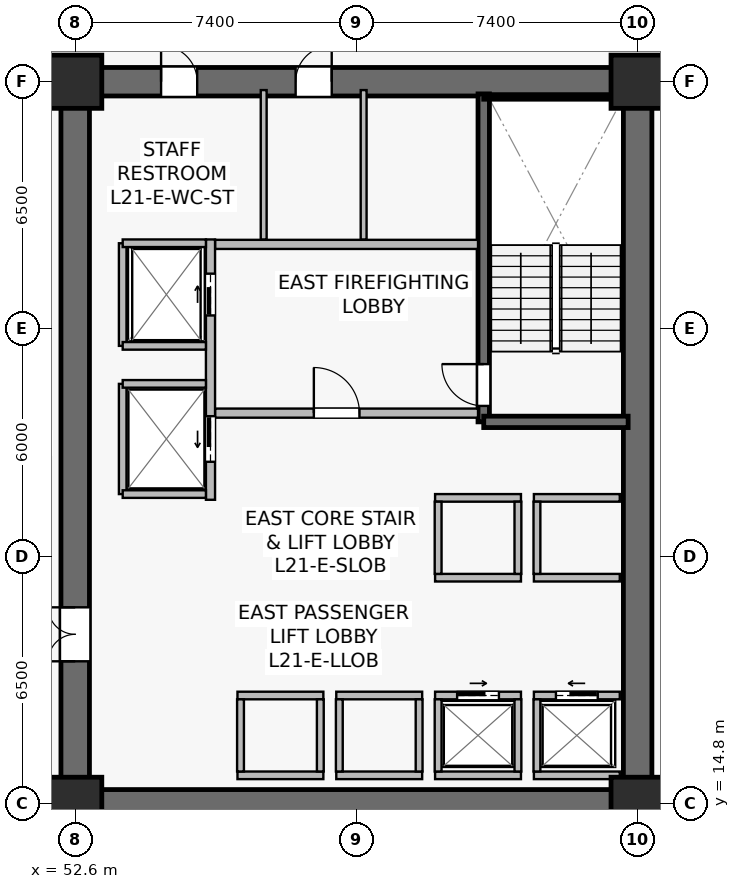
"""IFC4 building model, lengths in metres.
Left out: names, types, materials, properties, quantities, classifications, styles, units other than length and angle.
Written with IfcOpenShell. Run it as: python <this file> out.ifc"""

import sys

from ifc_helpers import new_model, si_unit, direction, frame, frame_2d, origin, origin_2d, place, context, subcontext, project, spatial, rectangle, extrude, source, transform, mapped, element, fill, save


model = new_model("IFC4")
c1 = context("Model", 3, precision=1e-05, world=origin(), true_north=direction((0.0, 1.0)))
c2 = subcontext(c1, "Body", "Model", "MODEL_VIEW")
j1 = project(units=[si_unit("LENGTHUNIT", "METRE"), si_unit("PLANEANGLEUNIT", "RADIAN")], contexts=[c1])
p1 = place(None, origin())
s1 = spatial("IfcSite", under=j1, at=p1, CompositionType="ELEMENT")
p2 = place(p1, origin())
s2 = spatial("IfcBuilding", under=s1, at=p2, CompositionType="ELEMENT")
p3 = place(p2, frame((0.0, 0.0, 86.7)))
s3 = spatial("IfcBuildingStorey", under=s2, at=p3, CompositionType="ELEMENT", Elevation=86.7)
p4 = place(p3, frame((52.225, 14.8, 0.0), z_axis=(0.0, 0.0, 1.0), x_axis=(1.0, 0.0, 0.0)))
e1 = element("IfcWall", 1, at=p4, inside=s3, PredefinedType="SHEAR", context=c2, shape_type="SweptSolid", body=[
    extrude(rectangle(XDim=15.55, YDim=0.75, at=frame_2d((7.775, 0.0))), origin(), (0.0, 0.0, 1.0), 3.78),
])
p5 = place(p3, frame((52.225, 33.8, 0.0), z_axis=(0.0, 0.0, 1.0), x_axis=(1.0, 0.0, 0.0)))
e2 = element("IfcWall", 2, at=p5, inside=s3, PredefinedType="SHEAR", context=c2, shape_type="SweptSolid", body=[
    extrude(rectangle(XDim=15.55, YDim=0.75, at=frame_2d((7.775, 0.0))), origin(), (0.0, 0.0, 1.0), 3.78),
])
p6 = place(p5, frame((6.175, 0.0, 0.0)))
e3 = element("IfcOpeningElement", 3, at=p6, cuts=e2, PredefinedType="OPENING", context=c2, shape_type="SweptSolid", body=[
    extrude(rectangle(XDim=0.95, YDim=2.15, at=frame_2d((0.475, 1.075))), frame((0.0, 0.385, 0.0), z_axis=(0.0, -1.0, 0.0), x_axis=(1.0, 0.0, 0.0)), (0.0, 0.0, 1.0), 0.77),
])
p7 = place(p5, frame((2.635, 0.0, 0.0)))
e4 = element("IfcOpeningElement", 4, at=p7, cuts=e2, PredefinedType="OPENING", context=c2, shape_type="SweptSolid", body=[
    extrude(rectangle(XDim=0.95, YDim=2.15, at=frame_2d((0.475, 1.075))), frame((0.0, 0.385, 0.0), z_axis=(0.0, -1.0, 0.0), x_axis=(1.0, 0.0, 0.0)), (0.0, 0.0, 1.0), 0.77),
])
p8 = place(p3, frame((52.6, 15.175, 0.0), z_axis=(0.0, 0.0, 1.0), x_axis=(0.0, 1.0, 0.0)))
e5 = element("IfcWall", 5, at=p8, inside=s3, PredefinedType="SHEAR", context=c2, shape_type="SweptSolid", body=[
    extrude(rectangle(XDim=18.25, YDim=0.75, at=frame_2d((9.125, 0.0))), origin(), (0.0, 0.0, 1.0), 3.78),
])
p9 = place(p8, frame((3.375, 0.0, 0.0)))
e6 = element("IfcOpeningElement", 6, at=p9, cuts=e5, PredefinedType="OPENING", context=c2, shape_type="SweptSolid", body=[
    extrude(rectangle(XDim=1.42, YDim=2.2, at=frame_2d((0.71, 1.1))), frame((0.0, 0.385, 0.0), z_axis=(0.0, -1.0, 0.0), x_axis=(1.0, 0.0, 0.0)), (0.0, 0.0, 1.0), 0.77),
])
p10 = place(p3, frame((67.4, 15.175, 0.0), z_axis=(0.0, 0.0, 1.0), x_axis=(0.0, 1.0, 0.0)))
e7 = element("IfcWall", 7, at=p10, inside=s3, PredefinedType="SHEAR", context=c2, shape_type="SweptSolid", body=[
    extrude(rectangle(XDim=18.25, YDim=0.75, at=frame_2d((9.125, 0.0))), origin(), (0.0, 0.0, 1.0), 3.78),
])
p11 = place(p3, frame((63.35, 24.85, 0.0), z_axis=(0.0, 0.0, 1.0), x_axis=(0.0, 1.0, 0.0)))
e8 = element("IfcWall", 8, at=p11, inside=s3, PredefinedType="SHEAR", context=c2, shape_type="SweptSolid", body=[
    extrude(rectangle(XDim=8.63, YDim=0.3, at=frame_2d((4.315, 0.0))), origin(), (0.0, 0.0, 1.0), 3.78),
])
p12 = place(p11, frame((0.42, 0.0, 0.0)))
e9 = element("IfcOpeningElement", 9, at=p12, cuts=e8, PredefinedType="OPENING", context=c2, shape_type="SweptSolid", body=[
    extrude(rectangle(XDim=1.1, YDim=2.15, at=frame_2d((0.55, 1.075))), frame((0.0, 0.16, 0.0), z_axis=(0.0, -1.0, 0.0), x_axis=(1.0, 0.0, 0.0)), (0.0, 0.0, 1.0), 0.32),
])
p13 = place(p3, frame((63.35, 24.85, 0.0), z_axis=(0.0, 0.0, 1.0), x_axis=(1.0, 0.0, 0.0)))
e10 = element("IfcWall", 10, at=p13, inside=s3, PredefinedType="SHEAR", context=c2, shape_type="SweptSolid", body=[
    extrude(rectangle(XDim=3.8, YDim=0.3, at=frame_2d((1.9, 0.0))), origin(), (0.0, 0.0, 1.0), 3.78),
])
p14 = place(p3, frame((63.35, 33.4, 0.0), z_axis=(0.0, 0.0, 1.0), x_axis=(1.0, 0.0, 0.0)))
e11 = element("IfcWall", 11, at=p14, inside=s3, PredefinedType="SOLIDWALL", context=c2, shape_type="SweptSolid", body=[
    extrude(rectangle(XDim=3.72, YDim=0.12, at=frame_2d((1.86, 0.0))), origin(), (0.0, 0.0, 1.0), 3.78),
])
m1 = source(origin(), c2, "Body", "SweptSolid", [
    extrude(rectangle(XDim=1.4, YDim=1.4, at=origin_2d()), origin(), (0.0, 0.0, 1.0), 4.1),
])
for number, where, z_axis, x_axis in (
    (12, (52.6, 14.8, 0.0), (0.0, 0.0, 1.0), (1.0, 0.0, 0.0)),
    (13, (67.4, 14.8, 0.0), (0.0, 0.0, 1.0), (1.0, 0.0, 0.0)),
    (14, (52.6, 33.8, 0.0), (0.0, 0.0, 1.0), (1.0, 0.0, 0.0)),
    (15, (67.4, 33.8, 0.0), (0.0, 0.0, 1.0), (1.0, 0.0, 0.0)),
):
    element("IfcColumn", number, at=place(p3, frame(where, z_axis=z_axis, x_axis=x_axis)), inside=s3, PredefinedType="COLUMN", context=c2, shape_type="MappedRepresentation", body=[
        mapped(m1, transform((0.0, 0.0, 0.0), scale=1.0)),
    ])
p15 = place(p3, frame((56.28, 25.08, 0.0), z_axis=(0.0, 0.0, 1.0), x_axis=(1.0, 0.0, 0.0)))
e16 = element("IfcWall", 16, at=p15, inside=s3, PredefinedType="SOLIDWALL", context=c2, shape_type="SweptSolid", body=[
    extrude(rectangle(XDim=6.92, YDim=0.24, at=frame_2d((3.46, 0.0))), origin(), (0.0, 0.0, 1.0), 3.115),
])
p16 = place(p15, frame((2.6, 0.0, 0.0)))
e17 = element("IfcOpeningElement", 17, at=p16, cuts=e16, PredefinedType="OPENING", context=c2, shape_type="SweptSolid", body=[
    extrude(rectangle(XDim=1.2, YDim=2.16, at=frame_2d((0.6, 1.08))), frame((0.0, 0.13, 0.0), z_axis=(0.0, -1.0, 0.0), x_axis=(1.0, 0.0, 0.0)), (0.0, 0.0, 1.0), 0.26),
])
p17 = place(p3, frame((56.28, 29.52, 0.0), z_axis=(0.0, 0.0, 1.0), x_axis=(1.0, 0.0, 0.0)))
e18 = element("IfcWall", 18, at=p17, inside=s3, PredefinedType="SOLIDWALL", context=c2, shape_type="SweptSolid", body=[
    extrude(rectangle(XDim=6.92, YDim=0.24, at=frame_2d((3.46, 0.0))), origin(), (0.0, 0.0, 1.0), 3.115),
])
p18 = place(p3, frame((56.16, 22.8, 0.0), z_axis=(0.0, 0.0, 1.0), x_axis=(0.0, 1.0, 0.0)))
e19 = element("IfcWall", 19, at=p18, inside=s3, PredefinedType="SOLIDWALL", context=c2, shape_type="SweptSolid", body=[
    extrude(rectangle(XDim=6.85, YDim=0.24, at=frame_2d((3.425, 0.0))), origin(), (0.0, 0.0, 1.0), 2.865),
])
p19 = place(p18, frame((4.85, 0.0, 0.0)))
e20 = element("IfcOpeningElement", 20, at=p19, cuts=e19, PredefinedType="OPENING", context=c2, shape_type="SweptSolid", body=[
    extrude(rectangle(XDim=1.1, YDim=2.22, at=frame_2d((0.55, 1.11))), frame((0.0, 0.13, 0.0), z_axis=(0.0, -1.0, 0.0), x_axis=(1.0, 0.0, 0.0)), (0.0, 0.0, 1.0), 0.26),
])
p20 = place(p18, frame((1.0, 0.0, 0.0)))
e21 = element("IfcOpeningElement", 21, at=p20, cuts=e19, PredefinedType="OPENING", context=c2, shape_type="SweptSolid", body=[
    extrude(rectangle(XDim=1.2, YDim=2.22, at=frame_2d((0.6, 1.11))), frame((0.0, 0.13, 0.0), z_axis=(0.0, -1.0, 0.0), x_axis=(1.0, 0.0, 0.0)), (0.0, 0.0, 1.0), 0.26),
])
p21 = place(p3, frame((64.67, 17.65, 0.0), z_axis=(0.0, 0.0, 1.0), x_axis=(1.0, 0.0, 0.0)))
e22 = element("IfcWall", 22, at=p21, inside=s3, PredefinedType="SOLIDWALL", context=c2, shape_type="SweptSolid", body=[
    extrude(rectangle(XDim=2.26, YDim=0.2, at=frame_2d((1.13, 0.0))), origin(), (0.0, 0.0, 1.0), 3.78),
])
p22 = place(p21, frame((0.58, 0.0, 0.0)))
e23 = element("IfcOpeningElement", 23, at=p22, cuts=e22, PredefinedType="OPENING", context=c2, shape_type="SweptSolid", body=[
    extrude(rectangle(XDim=1.1, YDim=2.22, at=frame_2d((0.55, 1.11))), frame((0.0, 0.11, 0.0), z_axis=(0.0, -1.0, 0.0), x_axis=(1.0, 0.0, 0.0)), (0.0, 0.0, 1.0), 0.22),
])
p23 = place(p3, frame((64.67, 15.55, 0.0), z_axis=(0.0, 0.0, 1.0), x_axis=(1.0, 0.0, 0.0)))
e24 = element("IfcWall", 24, at=p23, inside=s3, PredefinedType="SOLIDWALL", context=c2, shape_type="SweptSolid", body=[
    extrude(rectangle(XDim=2.26, YDim=0.2, at=frame_2d((1.13, 0.0))), origin(), (0.0, 0.0, 1.0), 3.78),
])
p24 = place(p3, frame((64.75, 15.65, 0.0), z_axis=(0.0, 0.0, 1.0), x_axis=(0.0, 1.0, 0.0)))
e25 = element("IfcWall", 25, at=p24, inside=s3, PredefinedType="SOLIDWALL", context=c2, shape_type="SweptSolid", body=[
    extrude(rectangle(XDim=1.9, YDim=0.18, at=frame_2d((0.95, 0.0))), origin(), (0.0, 0.0, 1.0), 3.78),
])
p25 = place(p3, frame((62.07, 17.65, 0.0), z_axis=(0.0, 0.0, 1.0), x_axis=(1.0, 0.0, 0.0)))
e26 = element("IfcWall", 26, at=p25, inside=s3, PredefinedType="SOLIDWALL", context=c2, shape_type="SweptSolid", body=[
    extrude(rectangle(XDim=2.26, YDim=0.2, at=frame_2d((1.13, 0.0))), origin(), (0.0, 0.0, 1.0), 3.78),
])
p26 = place(p25, frame((0.58, 0.0, 0.0)))
e27 = element("IfcOpeningElement", 27, at=p26, cuts=e26, PredefinedType="OPENING", context=c2, shape_type="SweptSolid", body=[
    extrude(rectangle(XDim=1.1, YDim=2.22, at=frame_2d((0.55, 1.11))), frame((0.0, 0.11, 0.0), z_axis=(0.0, -1.0, 0.0), x_axis=(1.0, 0.0, 0.0)), (0.0, 0.0, 1.0), 0.22),
])
p27 = place(p3, frame((62.07, 15.55, 0.0), z_axis=(0.0, 0.0, 1.0), x_axis=(1.0, 0.0, 0.0)))
e28 = element("IfcWall", 28, at=p27, inside=s3, PredefinedType="SOLIDWALL", context=c2, shape_type="SweptSolid", body=[
    extrude(rectangle(XDim=2.26, YDim=0.2, at=frame_2d((1.13, 0.0))), origin(), (0.0, 0.0, 1.0), 3.78),
])
for number, where, z_axis, x_axis in (
    (29, (62.15, 15.65, 0.0), (0.0, 0.0, 1.0), (0.0, 1.0, 0.0)),
    (30, (64.25, 15.65, 0.0), (0.0, 0.0, 1.0), (0.0, 1.0, 0.0)),
):
    element("IfcWall", number, at=place(p3, frame(where, z_axis=z_axis, x_axis=x_axis)), inside=s3, PredefinedType="SOLIDWALL", context=c2, shape_type="SweptSolid", body=[
        extrude(rectangle(XDim=1.9, YDim=0.18, at=frame_2d((0.95, 0.0))), origin(), (0.0, 0.0, 1.0), 3.78),
    ])
for number, where, z_axis, x_axis in (
    (31, (59.47, 17.65, 0.0), (0.0, 0.0, 1.0), (1.0, 0.0, 0.0)),
    (32, (59.47, 15.55, 0.0), (0.0, 0.0, 1.0), (1.0, 0.0, 0.0)),
):
    element("IfcWall", number, at=place(p3, frame(where, z_axis=z_axis, x_axis=x_axis)), inside=s3, PredefinedType="SOLIDWALL", context=c2, shape_type="SweptSolid", body=[
        extrude(rectangle(XDim=2.26, YDim=0.2, at=frame_2d((1.13, 0.0))), origin(), (0.0, 0.0, 1.0), 3.115),
    ])
for number, where, z_axis, x_axis in (
    (33, (59.55, 15.65, 0.0), (0.0, 0.0, 1.0), (0.0, 1.0, 0.0)),
    (34, (61.65, 15.65, 0.0), (0.0, 0.0, 1.0), (0.0, 1.0, 0.0)),
):
    element("IfcWall", number, at=place(p3, frame(where, z_axis=z_axis, x_axis=x_axis)), inside=s3, PredefinedType="SOLIDWALL", context=c2, shape_type="SweptSolid", body=[
        extrude(rectangle(XDim=1.9, YDim=0.18, at=frame_2d((0.95, 0.0))), origin(), (0.0, 0.0, 1.0), 3.78),
    ])
for number, where, z_axis, x_axis in (
    (35, (56.87, 17.65, 0.0), (0.0, 0.0, 1.0), (1.0, 0.0, 0.0)),
    (36, (56.87, 15.55, 0.0), (0.0, 0.0, 1.0), (1.0, 0.0, 0.0)),
):
    element("IfcWall", number, at=place(p3, frame(where, z_axis=z_axis, x_axis=x_axis)), inside=s3, PredefinedType="SOLIDWALL", context=c2, shape_type="SweptSolid", body=[
        extrude(rectangle(XDim=2.26, YDim=0.2, at=frame_2d((1.13, 0.0))), origin(), (0.0, 0.0, 1.0), 3.78),
    ])
for number, where, z_axis, x_axis in (
    (37, (56.95, 15.65, 0.0), (0.0, 0.0, 1.0), (0.0, 1.0, 0.0)),
    (38, (59.05, 15.65, 0.0), (0.0, 0.0, 1.0), (0.0, 1.0, 0.0)),
):
    element("IfcWall", number, at=place(p3, frame(where, z_axis=z_axis, x_axis=x_axis)), inside=s3, PredefinedType="SOLIDWALL", context=c2, shape_type="SweptSolid", body=[
        extrude(rectangle(XDim=1.9, YDim=0.18, at=frame_2d((0.95, 0.0))), origin(), (0.0, 0.0, 1.0), 3.78),
    ])
for number, where, z_axis, x_axis in (
    (39, (64.67, 20.75, 0.0), (0.0, 0.0, 1.0), (1.0, 0.0, 0.0)),
    (40, (64.67, 22.85, 0.0), (0.0, 0.0, 1.0), (1.0, 0.0, 0.0)),
):
    element("IfcWall", number, at=place(p3, frame(where, z_axis=z_axis, x_axis=x_axis)), inside=s3, PredefinedType="SOLIDWALL", context=c2, shape_type="SweptSolid", body=[
        extrude(rectangle(XDim=2.26, YDim=0.2, at=frame_2d((1.13, 0.0))), origin(), (0.0, 0.0, 1.0), 3.78),
    ])
p28 = place(p3, frame((64.75, 20.85, 0.0), z_axis=(0.0, 0.0, 1.0), x_axis=(0.0, 1.0, 0.0)))
e41 = element("IfcWall", 41, at=p28, inside=s3, PredefinedType="SOLIDWALL", context=c2, shape_type="SweptSolid", body=[
    extrude(rectangle(XDim=1.9, YDim=0.18, at=frame_2d((0.95, 0.0))), origin(), (0.0, 0.0, 1.0), 3.78),
])
for number, where, z_axis, x_axis in (
    (42, (62.07, 20.75, 0.0), (0.0, 0.0, 1.0), (1.0, 0.0, 0.0)),
    (43, (62.07, 22.85, 0.0), (0.0, 0.0, 1.0), (1.0, 0.0, 0.0)),
):
    element("IfcWall", number, at=place(p3, frame(where, z_axis=z_axis, x_axis=x_axis)), inside=s3, PredefinedType="SOLIDWALL", context=c2, shape_type="SweptSolid", body=[
        extrude(rectangle(XDim=2.26, YDim=0.2, at=frame_2d((1.13, 0.0))), origin(), (0.0, 0.0, 1.0), 3.78),
    ])
for number, where, z_axis, x_axis in (
    (44, (62.15, 20.85, 0.0), (0.0, 0.0, 1.0), (0.0, 1.0, 0.0)),
    (45, (64.25, 20.85, 0.0), (0.0, 0.0, 1.0), (0.0, 1.0, 0.0)),
):
    element("IfcWall", number, at=place(p3, frame(where, z_axis=z_axis, x_axis=x_axis)), inside=s3, PredefinedType="SOLIDWALL", context=c2, shape_type="SweptSolid", body=[
        extrude(rectangle(XDim=1.9, YDim=0.18, at=frame_2d((0.95, 0.0))), origin(), (0.0, 0.0, 1.0), 3.78),
    ])
p29 = place(p3, frame((53.85, 26.85, 0.0), z_axis=(0.0, 0.0, 1.0), x_axis=(0.0, 1.0, 0.0)))
e46 = element("IfcWall", 46, at=p29, inside=s3, PredefinedType="SOLIDWALL", context=c2, shape_type="SweptSolid", body=[
    extrude(rectangle(XDim=2.7, YDim=0.2, at=frame_2d((1.35, 0.0))), origin(), (0.0, 0.0, 1.0), 3.78),
])
p30 = place(p3, frame((53.85, 29.55, 0.0), z_axis=(0.0, 0.0, 1.0), x_axis=(1.0, 0.0, 0.0)))
e47 = element("IfcWall", 47, at=p30, inside=s3, PredefinedType="SOLIDWALL", context=c2, shape_type="SweptSolid", body=[
    extrude(rectangle(XDim=2.19, YDim=0.2, at=frame_2d((1.095, 0.0))), origin(), (0.0, 0.0, 1.0), 3.78),
])
p31 = place(p3, frame((53.85, 26.85, 0.0), z_axis=(0.0, 0.0, 1.0), x_axis=(1.0, 0.0, 0.0)))
e48 = element("IfcWall", 48, at=p31, inside=s3, PredefinedType="SOLIDWALL", context=c2, shape_type="SweptSolid", body=[
    extrude(rectangle(XDim=2.19, YDim=0.2, at=frame_2d((1.095, 0.0))), origin(), (0.0, 0.0, 1.0), 3.177),
])
p32 = place(p3, frame((53.85, 22.95, 0.0), z_axis=(0.0, 0.0, 1.0), x_axis=(0.0, 1.0, 0.0)))
e49 = element("IfcWall", 49, at=p32, inside=s3, PredefinedType="SOLIDWALL", context=c2, shape_type="SweptSolid", body=[
    extrude(rectangle(XDim=2.9, YDim=0.2, at=frame_2d((1.45, 0.0))), origin(), (0.0, 0.0, 1.0), 2.865),
])
for number, where, z_axis, x_axis in (
    (50, (53.85, 25.85, 0.0), (0.0, 0.0, 1.0), (1.0, 0.0, 0.0)),
    (51, (53.85, 22.95, 0.0), (0.0, 0.0, 1.0), (1.0, 0.0, 0.0)),
):
    element("IfcWall", number, at=place(p3, frame(where, z_axis=z_axis, x_axis=x_axis)), inside=s3, PredefinedType="SOLIDWALL", context=c2, shape_type="SweptSolid", body=[
        extrude(rectangle(XDim=2.19, YDim=0.2, at=frame_2d((1.095, 0.0))), origin(), (0.0, 0.0, 1.0), 3.78),
    ])
p33 = place(p3, frame((60.19, 29.65, 0.0), z_axis=(0.0, 0.0, 1.0), x_axis=(0.0, 1.0, 0.0)))
e52 = element("IfcWall", 52, at=p33, inside=s3, PredefinedType="PLUMBINGWALL", context=c2, shape_type="SweptSolid", body=[
    extrude(rectangle(XDim=3.93, YDim=0.155, at=frame_2d((1.965, 0.0))), origin(), (0.0, 0.0, 1.0), 3.115),
])
p34 = place(p3, frame((57.56, 29.65, 0.0), z_axis=(0.0, 0.0, 1.0), x_axis=(0.0, 1.0, 0.0)))
e53 = element("IfcWall", 53, at=p34, inside=s3, PredefinedType="PLUMBINGWALL", context=c2, shape_type="SweptSolid", body=[
    extrude(rectangle(XDim=3.93, YDim=0.155, at=frame_2d((1.965, 0.0))), origin(), (0.0, 0.0, 1.0), 3.78),
])
m2 = source(origin(), c2, "Body", "SweptSolid", [
    extrude(rectangle(XDim=1.1, YDim=2.15, at=frame_2d((0.55, 1.075))), frame((0.0, 0.025, 0.0), z_axis=(0.0, -1.0, 0.0), x_axis=(1.0, 0.0, 0.0)), (0.0, 0.0, 1.0), 0.05),
])
p35 = place(p12, origin())
e54 = element("IfcDoor", 54, at=p35, inside=s3, OperationType="SINGLE_SWING_RIGHT", PredefinedType="DOOR", context=c2, shape_type="MappedRepresentation", body=[
    mapped(m2, transform((0.0, 0.0, 0.0), scale=1.0)),
])
fill(e9, e54)
m3 = source(origin(), c2, "Body", "SweptSolid", [
    extrude(rectangle(XDim=1.2, YDim=2.16, at=frame_2d((0.6, 1.08))), frame((0.0, 0.025, 0.0), z_axis=(0.0, -1.0, 0.0), x_axis=(1.0, 0.0, 0.0)), (0.0, 0.0, 1.0), 0.05),
])
p36 = place(p16, origin())
e55 = element("IfcDoor", 55, at=p36, inside=s3, OperationType="SINGLE_SWING_LEFT", PredefinedType="DOOR", context=c2, shape_type="MappedRepresentation", body=[
    mapped(m3, transform((0.0, 0.0, 0.0), scale=1.0)),
])
fill(e17, e55)
m4 = source(origin(), c2, "Body", "SweptSolid", [
    extrude(rectangle(XDim=1.1, YDim=2.22, at=frame_2d((0.55, 1.11))), frame((0.0, 0.025, 0.0), z_axis=(0.0, -1.0, 0.0), x_axis=(1.0, 0.0, 0.0)), (0.0, 0.0, 1.0), 0.05),
])
p37 = place(p22, origin())
e56 = element("IfcDoor", 56, at=p37, inside=s3, OperationType="SLIDING_TO_LEFT", PredefinedType="USERDEFINED", context=c2, shape_type="MappedRepresentation", body=[
    mapped(m4, transform((0.0, 0.0, 0.0), scale=1.0)),
])
fill(e23, e56)
p38 = place(p26, origin())
e57 = element("IfcDoor", 57, at=p38, inside=s3, OperationType="SLIDING_TO_RIGHT", PredefinedType="USERDEFINED", context=c2, shape_type="MappedRepresentation", body=[
    mapped(m4, transform((0.0, 0.0, 0.0), scale=1.0)),
])
fill(e27, e57)
p39 = place(p19, origin())
e58 = element("IfcDoor", 58, at=p39, inside=s3, OperationType="SLIDING_TO_RIGHT", PredefinedType="USERDEFINED", context=c2, shape_type="MappedRepresentation", body=[
    mapped(m4, transform((0.0, 0.0, 0.0), scale=1.0)),
])
fill(e20, e58)
m5 = source(origin(), c2, "Body", "SweptSolid", [
    extrude(rectangle(XDim=1.2, YDim=2.22, at=frame_2d((0.6, 1.11))), frame((0.0, 0.025, 0.0), z_axis=(0.0, -1.0, 0.0), x_axis=(1.0, 0.0, 0.0)), (0.0, 0.0, 1.0), 0.05),
])
p40 = place(p20, origin())
e59 = element("IfcDoor", 59, at=p40, inside=s3, OperationType="SLIDING_TO_LEFT", PredefinedType="USERDEFINED", context=c2, shape_type="MappedRepresentation", body=[
    mapped(m5, transform((0.0, 0.0, 0.0), scale=1.0)),
])
fill(e21, e59)
m6 = source(origin(), c2, "Body", "SweptSolid", [
    extrude(rectangle(XDim=1.42, YDim=2.2, at=frame_2d((0.71, 1.1))), frame((0.0, 0.025, 0.0), z_axis=(0.0, -1.0, 0.0), x_axis=(1.0, 0.0, 0.0)), (0.0, 0.0, 1.0), 0.05),
])
p41 = place(p9, origin())
e60 = element("IfcDoor", 60, at=p41, inside=s3, OperationType="DOUBLE_DOOR_SINGLE_SWING", PredefinedType="DOOR", context=c2, shape_type="MappedRepresentation", body=[
    mapped(m6, transform((0.0, 0.0, 0.0), scale=1.0)),
])
fill(e6, e60)
m7 = source(origin(), c2, "Body", "SweptSolid", [
    extrude(rectangle(XDim=0.95, YDim=2.15, at=frame_2d((0.475, 1.075))), frame((0.0, 0.025, 0.0), z_axis=(0.0, -1.0, 0.0), x_axis=(1.0, 0.0, 0.0)), (0.0, 0.0, 1.0), 0.05),
])
p42 = place(p6, origin())
e61 = element("IfcDoor", 61, at=p42, inside=s3, OperationType="SINGLE_SWING_RIGHT", PredefinedType="DOOR", context=c2, shape_type="MappedRepresentation", body=[
    mapped(m7, transform((0.0, 0.0, 0.0), scale=1.0)),
])
fill(e3, e61)
p43 = place(p7, origin())
e62 = element("IfcDoor", 62, at=p43, inside=s3, OperationType="SINGLE_SWING_LEFT", PredefinedType="DOOR", context=c2, shape_type="MappedRepresentation", body=[
    mapped(m7, transform((0.0, 0.0, 0.0), scale=1.0)),
])
fill(e4, e62)
save(model, sys.argv[1])
